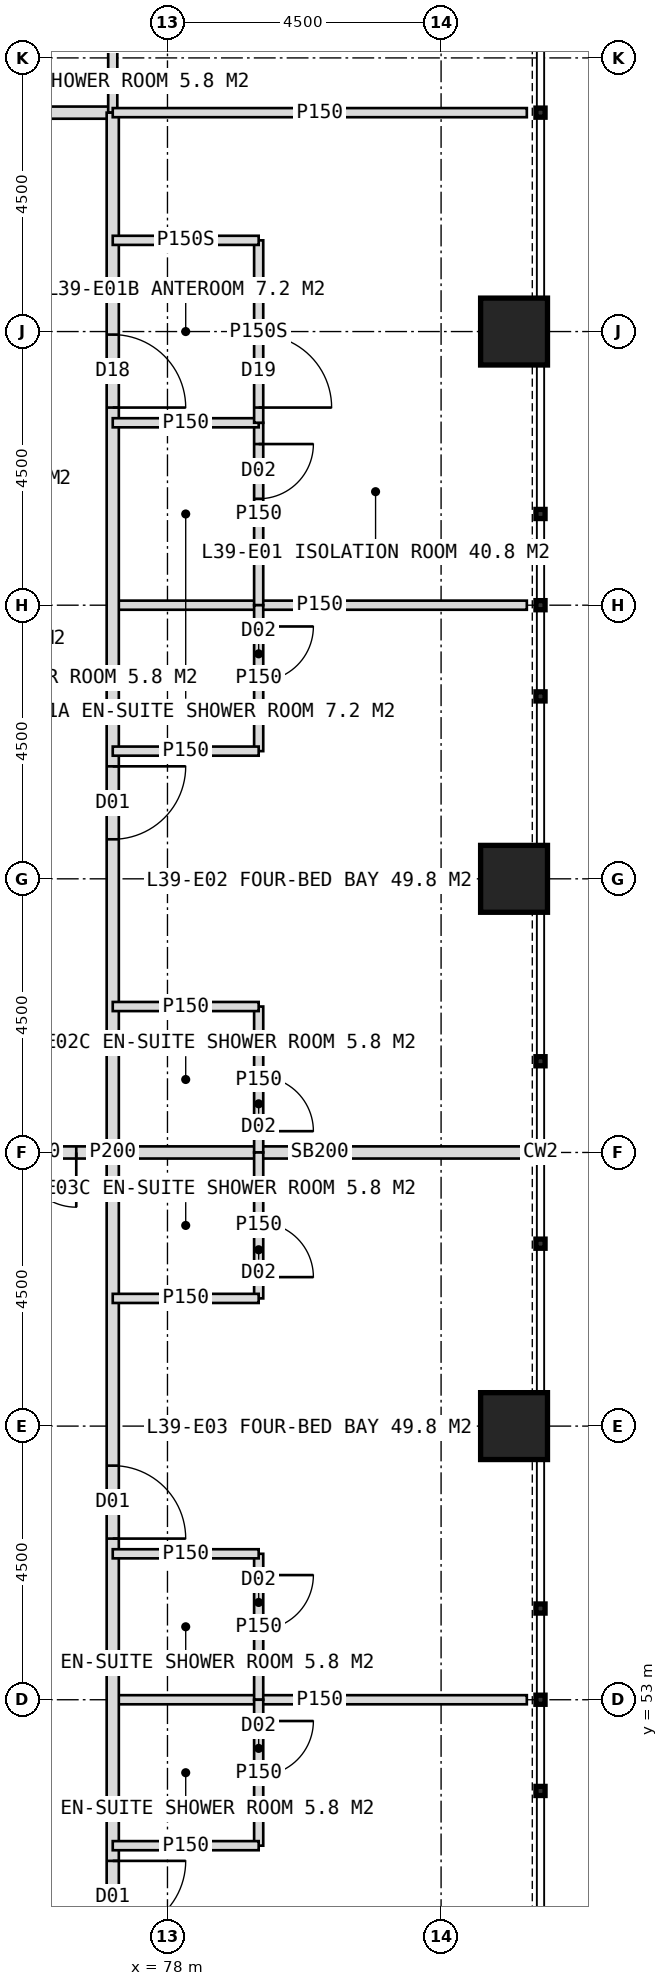
"""IFC4 building model, lengths in metres.
Left out: names, types, materials, properties, quantities, classifications, styles, units other than length and angle.
Written with IfcOpenShell. Run it as: python <this file> out.ifc"""

import sys

from ifc_helpers import new_model, si_unit, direction, frame, frame_2d, origin, origin_2d, place, context, subcontext, project, spatial, rectangle, hollow_rectangle, extrude, element, fill, save


model = new_model("IFC4")
c1 = context("Model", 3, precision=1e-05, world=origin(), true_north=direction((0.0, 1.0)))
c2 = subcontext(c1, "Body", "Model", "MODEL_VIEW")
j1 = project(units=[si_unit("LENGTHUNIT", "METRE"), si_unit("PLANEANGLEUNIT", "RADIAN")], contexts=[c1])
p1 = place(None, origin())
s1 = spatial("IfcSite", under=j1, at=p1, CompositionType="ELEMENT")
p2 = place(p1, origin())
s2 = spatial("IfcBuilding", under=s1, at=p2, CompositionType="ELEMENT")
p3 = place(p2, frame((0.0, 0.0, 164.0)))
s3 = spatial("IfcBuildingStorey", under=s2, at=p3, CompositionType="ELEMENT", Elevation=164.0)
for number, where, z_axis, x_axis in (
    (1, (83.7, 57.5, 0.0), (0.0, 0.0, 1.0), (1.0, 0.0, 0.0)),
    (2, (83.7, 66.5, 0.0), (0.0, 0.0, 1.0), (1.0, 0.0, 0.0)),
    (3, (83.7, 75.5, 0.0), (0.0, 0.0, 1.0), (1.0, 0.0, 0.0)),
):
    element("IfcColumn", number, at=place(p3, frame(where, z_axis=z_axis, x_axis=x_axis)), inside=s3, PredefinedType="COLUMN", context=c2, shape_type="SweptSolid", body=[
        extrude(hollow_rectangle(XDim=1.1, YDim=1.1, WallThickness=0.1, at=origin_2d()), origin(), (0.0, 0.0, 1.0), 4.0),
    ])
p4 = place(p3, frame((42.9, 79.1, 0.0), z_axis=(0.0, 0.0, 1.0), x_axis=(1.0, 0.0, 0.0)))
e4 = element("IfcWall", 4, at=p4, inside=s3, PredefinedType="PARTITIONING", context=c2, shape_type="SweptSolid", body=[
    extrude(rectangle(XDim=34.2, YDim=0.2, at=frame_2d((17.1, 0.0))), origin(), (0.0, 0.0, 1.0), 3.75),
])
p5 = place(p4, frame((3.55, 0.0, 0.0)))
e5 = element("IfcOpeningElement", 5, at=p5, cuts=e4, PredefinedType="OPENING", context=c2, shape_type="SweptSolid", body=[
    extrude(rectangle(XDim=1.0, YDim=2.1, at=frame_2d((0.5, 1.05))), frame((0.0, 0.11, 0.0), z_axis=(0.0, -1.0, 0.0), x_axis=(1.0, 0.0, 0.0)), (0.0, 0.0, 1.0), 0.22),
])
p6 = place(p4, frame((10.75, 0.0, 0.0)))
e6 = element("IfcOpeningElement", 6, at=p6, cuts=e4, PredefinedType="OPENING", context=c2, shape_type="SweptSolid", body=[
    extrude(rectangle(XDim=1.2, YDim=2.2, at=frame_2d((0.6, 1.1))), frame((0.0, 0.11, 0.0), z_axis=(0.0, -1.0, 0.0), x_axis=(1.0, 0.0, 0.0)), (0.0, 0.0, 1.0), 0.22),
])
p7 = place(p4, frame((20.75, 0.0, 0.0)))
e7 = element("IfcOpeningElement", 7, at=p7, cuts=e4, PredefinedType="OPENING", context=c2, shape_type="SweptSolid", body=[
    extrude(rectangle(XDim=1.2, YDim=2.2, at=frame_2d((0.6, 1.1))), frame((0.0, 0.11, 0.0), z_axis=(0.0, -1.0, 0.0), x_axis=(1.0, 0.0, 0.0)), (0.0, 0.0, 1.0), 0.22),
])
p8 = place(p4, frame((27.25, 0.0, 0.0)))
e8 = element("IfcOpeningElement", 8, at=p8, cuts=e4, PredefinedType="OPENING", context=c2, shape_type="SweptSolid", body=[
    extrude(rectangle(XDim=1.2, YDim=2.2, at=frame_2d((0.6, 1.1))), frame((0.0, 0.11, 0.0), z_axis=(0.0, -1.0, 0.0), x_axis=(1.0, 0.0, 0.0)), (0.0, 0.0, 1.0), 0.22),
])
p9 = place(p3, frame((77.1, 79.1, 0.0), z_axis=(0.0, 0.0, 1.0), x_axis=(0.0, 1.0, 0.0)))
e9 = element("IfcWall", 9, at=p9, inside=s3, PredefinedType="PARTITIONING", context=c2, shape_type="SweptSolid", body=[
    extrude(rectangle(XDim=2.4, YDim=0.15, at=frame_2d((1.2, 0.0))), origin(), (0.0, 0.0, 1.0), 3.75),
])
p10 = place(p3, frame((77.1, 71.0, 0.0), z_axis=(0.0, 0.0, 1.0), x_axis=(1.0, 0.0, 0.0)))
e10 = element("IfcWall", 10, at=p10, inside=s3, PredefinedType="PARTITIONING", context=c2, shape_type="SweptSolid", body=[
    extrude(rectangle(XDim=6.81, YDim=0.15, at=frame_2d((3.405, 0.0))), origin(), (0.0, 0.0, 1.0), 3.75),
])
p11 = place(p3, frame((77.1, 62.0, 0.0), z_axis=(0.0, 0.0, 1.0), x_axis=(1.0, 0.0, 0.0)))
e11 = element("IfcWall", 11, at=p11, inside=s3, PredefinedType="SOLIDWALL", context=c2, shape_type="SweptSolid", body=[
    extrude(rectangle(XDim=6.81, YDim=0.2, at=frame_2d((3.405, 0.0))), origin(), (0.0, 0.0, 1.0), 2.95),
])
p12 = place(p3, frame((77.1, 53.0, 0.0), z_axis=(0.0, 0.0, 1.0), x_axis=(1.0, 0.0, 0.0)))
e12 = element("IfcWall", 12, at=p12, inside=s3, PredefinedType="PARTITIONING", context=c2, shape_type="SweptSolid", body=[
    extrude(rectangle(XDim=6.81, YDim=0.15, at=frame_2d((3.405, 0.0))), origin(), (0.0, 0.0, 1.0), 3.75),
])
p13 = place(p3, frame((77.1, 79.1, 0.0), z_axis=(0.0, 0.0, 1.0), x_axis=(0.0, -1.0, 0.0)))
e13 = element("IfcWall", 13, at=p13, inside=s3, PredefinedType="PARTITIONING", context=c2, shape_type="SweptSolid", body=[
    extrude(rectangle(XDim=34.2, YDim=0.2, at=frame_2d((17.1, 0.0))), origin(), (0.0, 0.0, 1.0), 3.75),
])
p14 = place(p13, frame((3.65, 0.0, 0.0)))
e14 = element("IfcOpeningElement", 14, at=p14, cuts=e13, PredefinedType="OPENING", context=c2, shape_type="SweptSolid", body=[
    extrude(rectangle(XDim=1.2, YDim=2.2, at=frame_2d((0.6, 1.1))), frame((0.0, 0.11, 0.0), z_axis=(0.0, -1.0, 0.0), x_axis=(1.0, 0.0, 0.0)), (0.0, 0.0, 1.0), 0.22),
])
p15 = place(p13, frame((10.75, 0.0, 0.0)))
e15 = element("IfcOpeningElement", 15, at=p15, cuts=e13, PredefinedType="OPENING", context=c2, shape_type="SweptSolid", body=[
    extrude(rectangle(XDim=1.2, YDim=2.2, at=frame_2d((0.6, 1.1))), frame((0.0, 0.11, 0.0), z_axis=(0.0, -1.0, 0.0), x_axis=(1.0, 0.0, 0.0)), (0.0, 0.0, 1.0), 0.22),
])
p16 = place(p13, frame((22.25, 0.0, 0.0)))
e16 = element("IfcOpeningElement", 16, at=p16, cuts=e13, PredefinedType="OPENING", context=c2, shape_type="SweptSolid", body=[
    extrude(rectangle(XDim=1.2, YDim=2.2, at=frame_2d((0.6, 1.1))), frame((0.0, 0.11, 0.0), z_axis=(0.0, -1.0, 0.0), x_axis=(1.0, 0.0, 0.0)), (0.0, 0.0, 1.0), 0.22),
])
p17 = place(p13, frame((28.75, 0.0, 0.0)))
e17 = element("IfcOpeningElement", 17, at=p17, cuts=e13, PredefinedType="OPENING", context=c2, shape_type="SweptSolid", body=[
    extrude(rectangle(XDim=1.2, YDim=2.2, at=frame_2d((0.6, 1.1))), frame((0.0, 0.11, 0.0), z_axis=(0.0, -1.0, 0.0), x_axis=(1.0, 0.0, 0.0)), (0.0, 0.0, 1.0), 0.22),
])
p18 = place(p3, frame((77.1, 79.1, 0.0), z_axis=(0.0, 0.0, 1.0), x_axis=(1.0, 0.0, 0.0)))
e18 = element("IfcWall", 18, at=p18, inside=s3, PredefinedType="PARTITIONING", context=c2, shape_type="SweptSolid", body=[
    extrude(rectangle(XDim=6.81, YDim=0.15, at=frame_2d((3.405, 0.0))), origin(), (0.0, 0.0, 1.0), 3.75),
])
p19 = place(p3, frame((79.5, 74.0, 0.0), z_axis=(0.0, 0.0, 1.0), x_axis=(0.0, -1.0, 0.0)))
e19 = element("IfcWall", 19, at=p19, inside=s3, PredefinedType="PARTITIONING", context=c2, shape_type="SweptSolid", body=[
    extrude(rectangle(XDim=3.0, YDim=0.15, at=frame_2d((1.5, 0.0))), origin(), (0.0, 0.0, 1.0), 3.75),
])
p20 = place(p19, frame((0.35, 0.0, 0.0)))
e20 = element("IfcOpeningElement", 20, at=p20, cuts=e19, PredefinedType="OPENING", context=c2, shape_type="SweptSolid", body=[
    extrude(rectangle(XDim=0.9, YDim=2.1, at=frame_2d((0.45, 1.05))), frame((0.0, 0.085, 0.0), z_axis=(0.0, -1.0, 0.0), x_axis=(1.0, 0.0, 0.0)), (0.0, 0.0, 1.0), 0.17),
])
p21 = place(p3, frame((77.1, 74.0, 0.0), z_axis=(0.0, 0.0, 1.0), x_axis=(1.0, 0.0, 0.0)))
e21 = element("IfcWall", 21, at=p21, inside=s3, PredefinedType="PARTITIONING", context=c2, shape_type="SweptSolid", body=[
    extrude(rectangle(XDim=2.4, YDim=0.15, at=frame_2d((1.2, 0.0))), origin(), (0.0, 0.0, 1.0), 3.75),
])
p22 = place(p3, frame((79.5, 77.0, 0.0), z_axis=(0.0, 0.0, 1.0), x_axis=(0.0, -1.0, 0.0)))
e22 = element("IfcWall", 22, at=p22, inside=s3, PredefinedType="PARTITIONING", context=c2, shape_type="SweptSolid", body=[
    extrude(rectangle(XDim=3.0, YDim=0.15, at=frame_2d((1.5, 0.0))), origin(), (0.0, 0.0, 1.0), 3.75),
])
p23 = place(p22, frame((1.55, 0.0, 0.0)))
e23 = element("IfcOpeningElement", 23, at=p23, cuts=e22, PredefinedType="OPENING", context=c2, shape_type="SweptSolid", body=[
    extrude(rectangle(XDim=1.2, YDim=2.2, at=frame_2d((0.6, 1.1))), frame((0.0, 0.085, 0.0), z_axis=(0.0, -1.0, 0.0), x_axis=(1.0, 0.0, 0.0)), (0.0, 0.0, 1.0), 0.17),
])
p24 = place(p3, frame((77.1, 77.0, 0.0), z_axis=(0.0, 0.0, 1.0), x_axis=(1.0, 0.0, 0.0)))
e24 = element("IfcWall", 24, at=p24, inside=s3, PredefinedType="PARTITIONING", context=c2, shape_type="SweptSolid", body=[
    extrude(rectangle(XDim=2.4, YDim=0.15, at=frame_2d((1.2, 0.0))), origin(), (0.0, 0.0, 1.0), 3.75),
])
p25 = place(p3, frame((79.5, 71.0, 0.0), z_axis=(0.0, 0.0, 1.0), x_axis=(0.0, -1.0, 0.0)))
e25 = element("IfcWall", 25, at=p25, inside=s3, PredefinedType="PARTITIONING", context=c2, shape_type="SweptSolid", body=[
    extrude(rectangle(XDim=2.4, YDim=0.15, at=frame_2d((1.2, 0.0))), origin(), (0.0, 0.0, 1.0), 3.75),
])
p26 = place(p25, frame((0.35, 0.0, 0.0)))
e26 = element("IfcOpeningElement", 26, at=p26, cuts=e25, PredefinedType="OPENING", context=c2, shape_type="SweptSolid", body=[
    extrude(rectangle(XDim=0.9, YDim=2.1, at=frame_2d((0.45, 1.05))), frame((0.0, 0.085, 0.0), z_axis=(0.0, -1.0, 0.0), x_axis=(1.0, 0.0, 0.0)), (0.0, 0.0, 1.0), 0.17),
])
p27 = place(p3, frame((77.1, 68.6, 0.0), z_axis=(0.0, 0.0, 1.0), x_axis=(1.0, 0.0, 0.0)))
e27 = element("IfcWall", 27, at=p27, inside=s3, PredefinedType="PARTITIONING", context=c2, shape_type="SweptSolid", body=[
    extrude(rectangle(XDim=2.4, YDim=0.15, at=frame_2d((1.2, 0.0))), origin(), (0.0, 0.0, 1.0), 3.75),
])
p28 = place(p3, frame((79.5, 64.4, 0.0), z_axis=(0.0, 0.0, 1.0), x_axis=(0.0, -1.0, 0.0)))
e28 = element("IfcWall", 28, at=p28, inside=s3, PredefinedType="PARTITIONING", context=c2, shape_type="SweptSolid", body=[
    extrude(rectangle(XDim=2.4, YDim=0.15, at=frame_2d((1.2, 0.0))), origin(), (0.0, 0.0, 1.0), 3.75),
])
p29 = place(p28, frame((1.15, 0.0, 0.0)))
e29 = element("IfcOpeningElement", 29, at=p29, cuts=e28, PredefinedType="OPENING", context=c2, shape_type="SweptSolid", body=[
    extrude(rectangle(XDim=0.9, YDim=2.1, at=frame_2d((0.45, 1.05))), frame((0.0, 0.085, 0.0), z_axis=(0.0, -1.0, 0.0), x_axis=(1.0, 0.0, 0.0)), (0.0, 0.0, 1.0), 0.17),
])
p30 = place(p3, frame((77.1, 64.4, 0.0), z_axis=(0.0, 0.0, 1.0), x_axis=(1.0, 0.0, 0.0)))
e30 = element("IfcWall", 30, at=p30, inside=s3, PredefinedType="PARTITIONING", context=c2, shape_type="SweptSolid", body=[
    extrude(rectangle(XDim=2.4, YDim=0.15, at=frame_2d((1.2, 0.0))), origin(), (0.0, 0.0, 1.0), 3.75),
])
p31 = place(p3, frame((79.5, 55.4, 0.0), z_axis=(0.0, 0.0, 1.0), x_axis=(0.0, -1.0, 0.0)))
e31 = element("IfcWall", 31, at=p31, inside=s3, PredefinedType="PARTITIONING", context=c2, shape_type="SweptSolid", body=[
    extrude(rectangle(XDim=2.4, YDim=0.15, at=frame_2d((1.2, 0.0))), origin(), (0.0, 0.0, 1.0), 3.75),
])
p32 = place(p31, frame((0.35, 0.0, 0.0)))
e32 = element("IfcOpeningElement", 32, at=p32, cuts=e31, PredefinedType="OPENING", context=c2, shape_type="SweptSolid", body=[
    extrude(rectangle(XDim=0.9, YDim=2.1, at=frame_2d((0.45, 1.05))), frame((0.0, 0.085, 0.0), z_axis=(0.0, -1.0, 0.0), x_axis=(1.0, 0.0, 0.0)), (0.0, 0.0, 1.0), 0.17),
])
p33 = place(p3, frame((77.1, 55.4, 0.0), z_axis=(0.0, 0.0, 1.0), x_axis=(1.0, 0.0, 0.0)))
e33 = element("IfcWall", 33, at=p33, inside=s3, PredefinedType="PARTITIONING", context=c2, shape_type="SweptSolid", body=[
    extrude(rectangle(XDim=2.4, YDim=0.15, at=frame_2d((1.2, 0.0))), origin(), (0.0, 0.0, 1.0), 3.75),
])
p34 = place(p3, frame((79.5, 62.0, 0.0), z_axis=(0.0, 0.0, 1.0), x_axis=(0.0, -1.0, 0.0)))
e34 = element("IfcWall", 34, at=p34, inside=s3, PredefinedType="PARTITIONING", context=c2, shape_type="SweptSolid", body=[
    extrude(rectangle(XDim=2.4, YDim=0.15, at=frame_2d((1.2, 0.0))), origin(), (0.0, 0.0, 1.0), 3.75),
])
p35 = place(p34, frame((1.15, 0.0, 0.0)))
e35 = element("IfcOpeningElement", 35, at=p35, cuts=e34, PredefinedType="OPENING", context=c2, shape_type="SweptSolid", body=[
    extrude(rectangle(XDim=0.9, YDim=2.1, at=frame_2d((0.45, 1.05))), frame((0.0, 0.085, 0.0), z_axis=(0.0, -1.0, 0.0), x_axis=(1.0, 0.0, 0.0)), (0.0, 0.0, 1.0), 0.17),
])
p36 = place(p3, frame((77.1, 59.6, 0.0), z_axis=(0.0, 0.0, 1.0), x_axis=(1.0, 0.0, 0.0)))
e36 = element("IfcWall", 36, at=p36, inside=s3, PredefinedType="PARTITIONING", context=c2, shape_type="SweptSolid", body=[
    extrude(rectangle(XDim=2.4, YDim=0.15, at=frame_2d((1.2, 0.0))), origin(), (0.0, 0.0, 1.0), 3.75),
])
p37 = place(p3, frame((79.5, 53.0, 0.0), z_axis=(0.0, 0.0, 1.0), x_axis=(0.0, -1.0, 0.0)))
e37 = element("IfcWall", 37, at=p37, inside=s3, PredefinedType="PARTITIONING", context=c2, shape_type="SweptSolid", body=[
    extrude(rectangle(XDim=2.4, YDim=0.15, at=frame_2d((1.2, 0.0))), origin(), (0.0, 0.0, 1.0), 3.75),
])
p38 = place(p37, frame((0.35, 0.0, 0.0)))
e38 = element("IfcOpeningElement", 38, at=p38, cuts=e37, PredefinedType="OPENING", context=c2, shape_type="SweptSolid", body=[
    extrude(rectangle(XDim=0.9, YDim=2.1, at=frame_2d((0.45, 1.05))), frame((0.0, 0.085, 0.0), z_axis=(0.0, -1.0, 0.0), x_axis=(1.0, 0.0, 0.0)), (0.0, 0.0, 1.0), 0.17),
])
p39 = place(p3, frame((77.1, 50.6, 0.0), z_axis=(0.0, 0.0, 1.0), x_axis=(1.0, 0.0, 0.0)))
e39 = element("IfcWall", 39, at=p39, inside=s3, PredefinedType="PARTITIONING", context=c2, shape_type="SweptSolid", body=[
    extrude(rectangle(XDim=2.4, YDim=0.15, at=frame_2d((1.2, 0.0))), origin(), (0.0, 0.0, 1.0), 3.75),
])
p40 = place(p3, frame((74.4, 62.0, 0.0), z_axis=(0.0, 0.0, 1.0), x_axis=(1.0, 0.0, 0.0)))
e40 = element("IfcWall", 40, at=p40, inside=s3, PredefinedType="SOLIDWALL", context=c2, shape_type="SweptSolid", body=[
    extrude(rectangle(XDim=2.7, YDim=0.2, at=frame_2d((1.35, 0.0))), origin(), (0.0, 0.0, 1.0), 2.95),
])
p41 = place(p40, frame((0.3, 0.0, 0.0)))
e41 = element("IfcOpeningElement", 41, at=p41, cuts=e40, PredefinedType="OPENING", context=c2, shape_type="SweptSolid", body=[
    extrude(rectangle(XDim=1.8, YDim=2.2, at=frame_2d((0.9, 1.1))), frame((0.0, 0.11, 0.0), z_axis=(0.0, -1.0, 0.0), x_axis=(1.0, 0.0, 0.0)), (0.0, 0.0, 1.0), 0.22),
])
p42 = place(p23, origin())
e42 = element("IfcDoor", 42, at=p42, inside=s3, OperationType="SINGLE_SWING_RIGHT", PredefinedType="DOOR", context=c2, shape_type="SweptSolid", body=[
    extrude(rectangle(XDim=1.2, YDim=2.2, at=frame_2d((0.6, 1.1))), frame((0.0, 0.025, 0.0), z_axis=(0.0, -1.0, 0.0), x_axis=(1.0, 0.0, 0.0)), (0.0, 0.0, 1.0), 0.05),
])
fill(e23, e42)
p43 = place(p14, origin())
e43 = element("IfcDoor", 43, at=p43, inside=s3, OperationType="SINGLE_SWING_RIGHT", PredefinedType="DOOR", context=c2, shape_type="SweptSolid", body=[
    extrude(rectangle(XDim=1.2, YDim=2.2, at=frame_2d((0.6, 1.1))), frame((0.0, 0.025, 0.0), z_axis=(0.0, -1.0, 0.0), x_axis=(1.0, 0.0, 0.0)), (0.0, 0.0, 1.0), 0.05),
])
fill(e14, e43)
p44 = place(p20, origin())
e44 = element("IfcDoor", 44, at=p44, inside=s3, OperationType="SINGLE_SWING_LEFT", PredefinedType="DOOR", context=c2, shape_type="SweptSolid", body=[
    extrude(rectangle(XDim=0.9, YDim=2.1, at=frame_2d((0.45, 1.05))), frame((0.0, 0.025, 0.0), z_axis=(0.0, -1.0, 0.0), x_axis=(1.0, 0.0, 0.0)), (0.0, 0.0, 1.0), 0.05),
])
fill(e20, e44)
p45 = place(p15, origin())
e45 = element("IfcDoor", 45, at=p45, inside=s3, OperationType="SINGLE_SWING_LEFT", PredefinedType="DOOR", context=c2, shape_type="SweptSolid", body=[
    extrude(rectangle(XDim=1.2, YDim=2.2, at=frame_2d((0.6, 1.1))), frame((0.0, 0.025, 0.0), z_axis=(0.0, -1.0, 0.0), x_axis=(1.0, 0.0, 0.0)), (0.0, 0.0, 1.0), 0.05),
])
fill(e15, e45)
p46 = place(p26, origin())
e46 = element("IfcDoor", 46, at=p46, inside=s3, OperationType="SINGLE_SWING_LEFT", PredefinedType="DOOR", context=c2, shape_type="SweptSolid", body=[
    extrude(rectangle(XDim=0.9, YDim=2.1, at=frame_2d((0.45, 1.05))), frame((0.0, 0.025, 0.0), z_axis=(0.0, -1.0, 0.0), x_axis=(1.0, 0.0, 0.0)), (0.0, 0.0, 1.0), 0.05),
])
fill(e26, e46)
p47 = place(p29, origin())
e47 = element("IfcDoor", 47, at=p47, inside=s3, OperationType="SINGLE_SWING_RIGHT", PredefinedType="DOOR", context=c2, shape_type="SweptSolid", body=[
    extrude(rectangle(XDim=0.9, YDim=2.1, at=frame_2d((0.45, 1.05))), frame((0.0, 0.025, 0.0), z_axis=(0.0, -1.0, 0.0), x_axis=(1.0, 0.0, 0.0)), (0.0, 0.0, 1.0), 0.05),
])
fill(e29, e47)
p48 = place(p16, origin())
e48 = element("IfcDoor", 48, at=p48, inside=s3, OperationType="SINGLE_SWING_RIGHT", PredefinedType="DOOR", context=c2, shape_type="SweptSolid", body=[
    extrude(rectangle(XDim=1.2, YDim=2.2, at=frame_2d((0.6, 1.1))), frame((0.0, 0.025, 0.0), z_axis=(0.0, -1.0, 0.0), x_axis=(1.0, 0.0, 0.0)), (0.0, 0.0, 1.0), 0.05),
])
fill(e16, e48)
p49 = place(p32, origin())
e49 = element("IfcDoor", 49, at=p49, inside=s3, OperationType="SINGLE_SWING_LEFT", PredefinedType="DOOR", context=c2, shape_type="SweptSolid", body=[
    extrude(rectangle(XDim=0.9, YDim=2.1, at=frame_2d((0.45, 1.05))), frame((0.0, 0.025, 0.0), z_axis=(0.0, -1.0, 0.0), x_axis=(1.0, 0.0, 0.0)), (0.0, 0.0, 1.0), 0.05),
])
fill(e32, e49)
p50 = place(p35, origin())
e50 = element("IfcDoor", 50, at=p50, inside=s3, OperationType="SINGLE_SWING_RIGHT", PredefinedType="DOOR", context=c2, shape_type="SweptSolid", body=[
    extrude(rectangle(XDim=0.9, YDim=2.1, at=frame_2d((0.45, 1.05))), frame((0.0, 0.025, 0.0), z_axis=(0.0, -1.0, 0.0), x_axis=(1.0, 0.0, 0.0)), (0.0, 0.0, 1.0), 0.05),
])
fill(e35, e50)
p51 = place(p17, origin())
e51 = element("IfcDoor", 51, at=p51, inside=s3, OperationType="SINGLE_SWING_LEFT", PredefinedType="DOOR", context=c2, shape_type="SweptSolid", body=[
    extrude(rectangle(XDim=1.2, YDim=2.2, at=frame_2d((0.6, 1.1))), frame((0.0, 0.025, 0.0), z_axis=(0.0, -1.0, 0.0), x_axis=(1.0, 0.0, 0.0)), (0.0, 0.0, 1.0), 0.05),
])
fill(e17, e51)
p52 = place(p38, origin())
e52 = element("IfcDoor", 52, at=p52, inside=s3, OperationType="SINGLE_SWING_LEFT", PredefinedType="DOOR", context=c2, shape_type="SweptSolid", body=[
    extrude(rectangle(XDim=0.9, YDim=2.1, at=frame_2d((0.45, 1.05))), frame((0.0, 0.025, 0.0), z_axis=(0.0, -1.0, 0.0), x_axis=(1.0, 0.0, 0.0)), (0.0, 0.0, 1.0), 0.05),
])
fill(e38, e52)
p53 = place(p41, origin())
e53 = element("IfcDoor", 53, at=p53, inside=s3, OperationType="DOUBLE_DOOR_DOUBLE_SWING", PredefinedType="DOOR", context=c2, shape_type="SweptSolid", body=[
    extrude(rectangle(XDim=1.8, YDim=2.2, at=frame_2d((0.9, 1.1))), frame((0.0, 0.025, 0.0), z_axis=(0.0, -1.0, 0.0), x_axis=(1.0, 0.0, 0.0)), (0.0, 0.0, 1.0), 0.05),
])
fill(e41, e53)
save(model, sys.argv[1])
